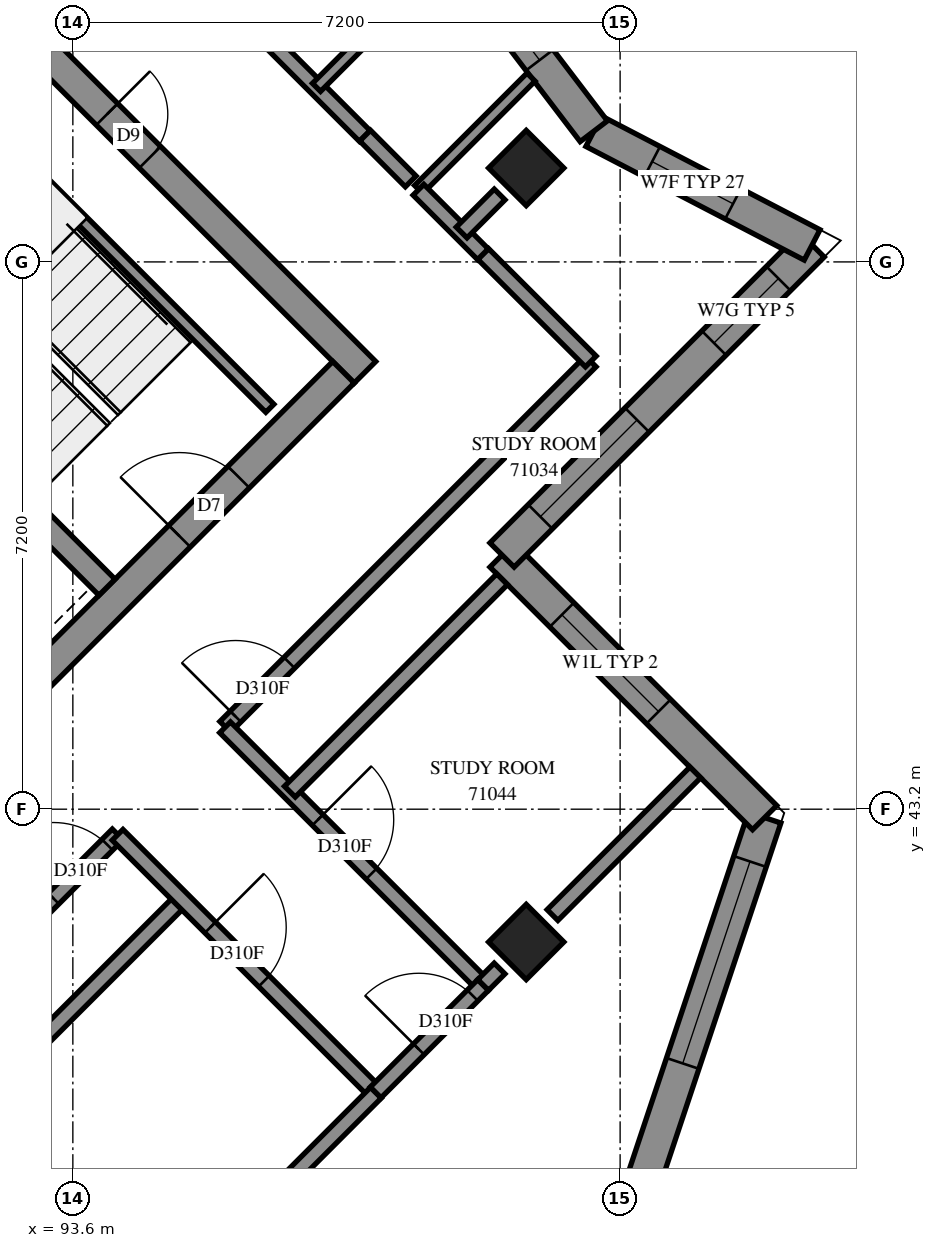
"""IFC4 building model, lengths in metres.
Left out: names, types, materials, properties, quantities, classifications, styles, units other than length and angle.
Written with IfcOpenShell. Run it as: python <this file> out.ifc"""

import sys

from ifc_helpers import new_model, si_unit, direction, frame, frame_2d, origin, origin_2d, place, context, subcontext, project, spatial, polyline, rectangle, outline, extrude, element, fill, save


model = new_model("IFC4")
c1 = context("Model", 3, precision=1e-05, world=origin(), true_north=direction((0.0, 1.0)))
c2 = subcontext(c1, "Body", "Model", "MODEL_VIEW")
j1 = project(units=[si_unit("LENGTHUNIT", "METRE"), si_unit("PLANEANGLEUNIT", "RADIAN")], contexts=[c1])
p1 = place(None, origin())
s1 = spatial("IfcSite", under=j1, at=p1, CompositionType="ELEMENT")
p2 = place(p1, origin())
s2 = spatial("IfcBuilding", under=s1, at=p2, CompositionType="ELEMENT")
p3 = place(p2, frame((0.0, 0.0, 260.8)))
s3 = spatial("IfcBuildingStorey", under=s2, at=p3, CompositionType="ELEMENT", Elevation=260.8)
for number, where, z_axis, x_axis in (
    (1, (99.565, 51.635, 0.0), (0.0, 0.0, 1.0), (0.707, -0.707, 0.0)),
    (2, (99.565, 41.453, 0.0), (0.0, 0.0, 1.0), (0.707, -0.707, 0.0)),
):
    element("IfcColumn", number, at=place(p3, frame(where, z_axis=z_axis, x_axis=x_axis)), inside=s3, PredefinedType="COLUMN", context=c2, shape_type="SweptSolid", body=[
        extrude(rectangle(XDim=0.7, YDim=0.7, at=origin_2d()), origin(), (0.0, 0.0, 1.0), 3.1),
    ])
p4 = place(p3, frame((86.695, 59.696, -0.3), z_axis=(0.0, 0.0, 1.0), x_axis=(0.7071100706, -0.7071034917, 0.0)))
e3 = element("IfcWall", 3, at=p4, inside=s3, PredefinedType="SHEAR", context=c2, shape_type="SweptSolid", body=[
    extrude(rectangle(XDim=15.2, YDim=0.4, at=frame_2d((7.6, 0.0))), origin(), (0.0, 0.0, 1.0), 2.7),
])
p5 = place(p4, frame((10.4, 0.0, 0.3)))
e4 = element("IfcOpeningElement", 4, at=p5, cuts=e3, PredefinedType="OPENING", context=c2, shape_type="SweptSolid", body=[
    extrude(rectangle(XDim=0.8, YDim=2.1, at=frame_2d((0.4, 1.05))), frame((0.0, 0.21, 0.0), z_axis=(0.0, -1.0, 0.0), x_axis=(1.0, 0.0, 0.0)), (0.0, 0.0, 1.0), 0.42),
])
p6 = place(p3, frame((86.978, 38.766, -0.3), z_axis=(0.0, 0.0, 1.0), x_axis=(0.7071067812, 0.7071067812, 0.0)))
e5 = element("IfcWall", 5, at=p6, inside=s3, PredefinedType="SHEAR", context=c2, shape_type="SweptSolid", body=[
    extrude(rectangle(XDim=14.4, YDim=0.4, at=frame_2d((7.2, 0.0))), origin(), (0.0, 0.0, 1.0), 2.7),
])
p7 = place(p6, frame((4.55, 0.0, 0.3)))
e6 = element("IfcOpeningElement", 6, at=p7, cuts=e5, PredefinedType="OPENING", context=c2, shape_type="SweptSolid", body=[
    extrude(rectangle(XDim=1.1, YDim=2.1, at=frame_2d((0.55, 1.05))), frame((0.0, 0.21, 0.0), z_axis=(0.0, -1.0, 0.0), x_axis=(1.0, 0.0, 0.0)), (0.0, 0.0, 1.0), 0.42),
])
p8 = place(p6, frame((11.35, 0.0, 0.3)))
e7 = element("IfcOpeningElement", 7, at=p8, cuts=e5, PredefinedType="OPENING", context=c2, shape_type="SweptSolid", body=[
    extrude(rectangle(XDim=1.1, YDim=2.1, at=frame_2d((0.55, 1.05))), frame((0.0, 0.21, 0.0), z_axis=(0.0, -1.0, 0.0), x_axis=(1.0, 0.0, 0.0)), (0.0, 0.0, 1.0), 0.42),
])
p9 = place(p3, frame((88.958, 51.211, 0.0), z_axis=(0.0, 0.0, 1.0), x_axis=(0.7070998367, -0.7071137256, 0.0)))
e8 = element("IfcWall", 8, at=p9, inside=s3, PredefinedType="SOLIDWALL", context=c2, shape_type="SweptSolid", body=[
    extrude(rectangle(XDim=7.2, YDim=0.3, at=frame_2d((3.6, 0.0))), origin(), (0.0, 0.0, 1.0), 3.1),
])
p10 = place(p3, frame((101.082, 38.232, 0.0), z_axis=(0.0, 0.0, 1.0), x_axis=(0.316227766, 0.9486832981, 0.0)))
e9 = element("IfcWall", 9, at=p10, inside=s3, PredefinedType="SOLIDWALL", context=c2, shape_type="SweptSolid", body=[
    extrude(outline(polyline([(-0.108, -0.225), (5.259, -0.225), (4.981, 0.225), (0.108, 0.225), (-0.108, -0.225)])), origin(), (0.0, 0.0, 1.0), 3.1),
])
p11 = place(p10, frame((1.711, 0.0, 0.45)))
e10 = element("IfcOpeningElement", 10, at=p11, cuts=e9, PredefinedType="OPENING", context=c2, shape_type="SweptSolid", body=[
    extrude(rectangle(XDim=2.8, YDim=2.55, at=frame_2d((1.4, 1.275))), frame((0.0, 0.235, 0.0), z_axis=(0.0, -1.0, 0.0), x_axis=(1.0, 0.0, 0.0)), (0.0, 0.0, 1.0), 0.47),
])
p12 = place(p3, frame((102.701, 43.089, 0.0), z_axis=(0.0, 0.0, 1.0), x_axis=(-0.7070965479, 0.7071170144, 0.0)))
e11 = element("IfcWall", 11, at=p12, inside=s3, PredefinedType="SOLIDWALL", context=c2, shape_type="SweptSolid", body=[
    extrude(outline(polyline([(-0.139, -0.225), (4.661, -0.225), (5.111, 0.225), (0.139, 0.225), (-0.139, -0.225)])), origin(), (0.0, 0.0, 1.0), 3.1),
])
p13 = place(p12, frame((1.974, 0.0, 0.6)))
e12 = element("IfcOpeningElement", 12, at=p13, cuts=e11, PredefinedType="OPENING", context=c2, shape_type="SweptSolid", body=[
    extrude(rectangle(XDim=1.8, YDim=1.9, at=frame_2d((0.9, 0.95))), frame((0.0, 0.235, 0.0), z_axis=(0.0, -1.0, 0.0), x_axis=(1.0, 0.0, 0.0)), (0.0, 0.0, 1.0), 0.47),
])
p14 = place(p3, frame((99.246, 46.544, 0.0), z_axis=(0.0, 0.0, 1.0), x_axis=(0.7071067812, 0.7071067812, 0.0)))
e13 = element("IfcWall", 13, at=p14, inside=s3, PredefinedType="SOLIDWALL", context=c2, shape_type="SweptSolid", body=[
    extrude(outline(polyline([(0.225, -0.225), (6.076, -0.225), (5.462, 0.225), (-0.225, 0.225), (0.225, -0.225)])), origin(), (0.0, 0.0, 1.0), 3.1),
])
p15 = place(p14, frame((0.713, 0.0, 0.6)))
e14 = element("IfcOpeningElement", 14, at=p15, cuts=e13, PredefinedType="OPENING", context=c2, shape_type="SweptSolid", body=[
    extrude(rectangle(XDim=1.8, YDim=1.9, at=frame_2d((0.9, 0.95))), frame((0.0, 0.235, 0.0), z_axis=(0.0, -1.0, 0.0), x_axis=(1.0, 0.0, 0.0)), (0.0, 0.0, 1.0), 0.47),
])
p16 = place(p14, frame((3.944, 0.0, 0.6)))
e15 = element("IfcOpeningElement", 15, at=p16, cuts=e13, PredefinedType="OPENING", context=c2, shape_type="SweptSolid", body=[
    extrude(rectangle(XDim=1.2, YDim=1.9, at=frame_2d((0.6, 0.95))), frame((0.0, 0.235, 0.0), z_axis=(0.0, -1.0, 0.0), x_axis=(1.0, 0.0, 0.0)), (0.0, 0.0, 1.0), 0.47),
])
p17 = place(p3, frame((103.326, 50.624, 0.0), z_axis=(0.0, 0.0, 1.0), x_axis=(-0.8870210657, 0.4617289562, 0.0)))
e16 = element("IfcWall", 16, at=p17, inside=s3, PredefinedType="SOLIDWALL", context=c2, shape_type="SweptSolid", body=[
    extrude(outline(polyline([(-0.307, -0.225), (3.188, -0.225), (3.289, 0.225), (0.307, 0.225), (-0.307, -0.225)])), origin(), (0.0, 0.0, 1.0), 3.1),
])
p18 = place(p17, frame((1.173, 0.0, 0.45)))
e17 = element("IfcOpeningElement", 17, at=p18, cuts=e16, PredefinedType="OPENING", context=c2, shape_type="SweptSolid", body=[
    extrude(rectangle(XDim=1.2, YDim=2.55, at=frame_2d((0.6, 1.275))), frame((0.0, 0.235, 0.0), z_axis=(0.0, -1.0, 0.0), x_axis=(1.0, 0.0, 0.0)), (0.0, 0.0, 1.0), 0.47),
])
p19 = place(p3, frame((100.453, 52.119, 0.0), z_axis=(0.0, 0.0, 1.0), x_axis=(-0.6058900407, 0.7955484012, 0.0)))
e18 = element("IfcWall", 18, at=p19, inside=s3, PredefinedType="SOLIDWALL", context=c2, shape_type="SweptSolid", body=[
    extrude(outline(polyline([(0.05, -0.225), (3.414, -0.225), (3.353, 0.225), (-0.05, 0.225), (0.05, -0.225)])), origin(), (0.0, 0.0, 1.0), 3.1),
])
p20 = place(p19, frame((1.177, 0.0, 0.45)))
e19 = element("IfcOpeningElement", 19, at=p20, cuts=e18, PredefinedType="OPENING", context=c2, shape_type="SweptSolid", body=[
    extrude(rectangle(XDim=1.2, YDim=2.55, at=frame_2d((0.6, 1.275))), frame((0.0, 0.235, 0.0), z_axis=(0.0, -1.0, 0.0), x_axis=(1.0, 0.0, 0.0)), (0.0, 0.0, 1.0), 0.47),
])
p21 = place(p3, frame((91.313, 53.354, 0.0), z_axis=(0.0, 0.0, 1.0), x_axis=(0.7071140275, -0.7070995348, 0.0)))
e20 = element("IfcWall", 20, at=p21, inside=s3, PredefinedType="PARTITIONING", context=c2, shape_type="SweptSolid", body=[
    extrude(rectangle(XDim=6.9, YDim=0.15, at=frame_2d((3.45, 0.0))), origin(), (0.0, 0.0, 1.0), 3.1),
])
p22 = place(p3, frame((84.954, 31.938, 0.0), z_axis=(0.0, 0.0, 1.0), x_axis=(0.7071769042, 0.7070366512, 0.0)))
e21 = element("IfcWall", 21, at=p22, inside=s3, PredefinedType="PARTITIONING", context=c2, shape_type="SweptSolid", body=[
    extrude(rectangle(XDim=14.26, YDim=0.2, at=frame_2d((7.13, 0.0))), origin(), (0.0, 0.0, 1.0), 3.1),
])
p23 = place(p3, frame((86.836, 35.514, 0.0), z_axis=(0.0, 0.0, 1.0), x_axis=(0.7071067812, 0.7071067812, 0.0)))
e22 = element("IfcWall", 22, at=p23, inside=s3, PredefinedType="PARTITIONING", context=c2, shape_type="SweptSolid", body=[
    extrude(rectangle(XDim=10.4, YDim=0.2, at=frame_2d((5.2, 0.0))), origin(), (0.0, 0.0, 1.0), 3.1),
])
p24 = place(p23, frame((9.207, 0.0, 0.0)))
e23 = element("IfcOpeningElement", 23, at=p24, cuts=e22, PredefinedType="OPENING", context=c2, shape_type="SweptSolid", body=[
    extrude(rectangle(XDim=1.0, YDim=2.1, at=frame_2d((0.5, 1.05))), frame((0.0, 0.11, 0.0), z_axis=(0.0, -1.0, 0.0), x_axis=(1.0, 0.0, 0.0)), (0.0, 0.0, 1.0), 0.22),
])
p25 = place(p3, frame((95.605, 44.283, 0.0), z_axis=(0.0, 0.0, 1.0), x_axis=(0.7071067812, 0.7071067812, 0.0)))
e24 = element("IfcWall", 24, at=p25, inside=s3, PredefinedType="PARTITIONING", context=c2, shape_type="SweptSolid", body=[
    extrude(rectangle(XDim=6.8, YDim=0.2, at=frame_2d((3.4, 0.0))), origin(), (0.0, 0.0, 1.0), 3.1),
])
p26 = place(p25, frame((0.193, 0.0, 0.0)))
e25 = element("IfcOpeningElement", 25, at=p26, cuts=e24, PredefinedType="OPENING", context=c2, shape_type="SweptSolid", body=[
    extrude(rectangle(XDim=1.0, YDim=2.1, at=frame_2d((0.5, 1.05))), frame((0.0, 0.11, 0.0), z_axis=(0.0, -1.0, 0.0), x_axis=(1.0, 0.0, 0.0)), (0.0, 0.0, 1.0), 0.22),
])
p27 = place(p3, frame((93.621, 55.875, 0.0), z_axis=(0.0, 0.0, 1.0), x_axis=(0.7071623255, -0.7070512325, 0.0)))
e26 = element("IfcWall", 26, at=p27, inside=s3, PredefinedType="PARTITIONING", context=c2, shape_type="SweptSolid", body=[
    extrude(rectangle(XDim=5.401, YDim=0.2, at=frame_2d((2.7, 0.0))), origin(), (0.0, 0.0, 1.0), 3.1),
])
p28 = place(p27, frame((0.611, 0.0, 0.0)))
e27 = element("IfcOpeningElement", 27, at=p28, cuts=e26, PredefinedType="OPENING", context=c2, shape_type="SweptSolid", body=[
    extrude(rectangle(XDim=0.9, YDim=2.1, at=frame_2d((0.45, 1.05))), frame((0.0, 0.11, 0.0), z_axis=(0.0, -1.0, 0.0), x_axis=(1.0, 0.0, 0.0)), (0.0, 0.0, 1.0), 0.22),
])
p29 = place(p3, frame((95.603, 44.277, 0.0), z_axis=(0.0, 0.0, 1.0), x_axis=(0.7071067812, -0.7071067812, 0.0)))
e28 = element("IfcWall", 28, at=p29, inside=s3, PredefinedType="PARTITIONING", context=c2, shape_type="SweptSolid", body=[
    extrude(rectangle(XDim=4.797, YDim=0.2, at=frame_2d((2.398, 0.0))), origin(), (0.0, 0.0, 1.0), 3.1),
])
p30 = place(p29, frame((1.723, 0.0, 0.0)))
e29 = element("IfcOpeningElement", 29, at=p30, cuts=e28, PredefinedType="OPENING", context=c2, shape_type="SweptSolid", body=[
    extrude(rectangle(XDim=1.0, YDim=2.1, at=frame_2d((0.5, 1.05))), frame((0.0, 0.11, 0.0), z_axis=(0.0, -1.0, 0.0), x_axis=(1.0, 0.0, 0.0)), (0.0, 0.0, 1.0), 0.22),
])
p31 = place(p3, frame((94.189, 42.863, 0.0), z_axis=(0.0, 0.0, 1.0), x_axis=(0.7071067812, -0.7071067812, 0.0)))
e30 = element("IfcWall", 30, at=p31, inside=s3, PredefinedType="PARTITIONING", context=c2, shape_type="SweptSolid", body=[
    extrude(rectangle(XDim=4.797, YDim=0.2, at=frame_2d((2.398, 0.0))), origin(), (0.0, 0.0, 1.0), 3.1),
])
p32 = place(p31, frame((1.723, 0.0, 0.0)))
e31 = element("IfcOpeningElement", 31, at=p32, cuts=e30, PredefinedType="OPENING", context=c2, shape_type="SweptSolid", body=[
    extrude(rectangle(XDim=1.0, YDim=2.1, at=frame_2d((0.5, 1.05))), frame((0.0, 0.11, 0.0), z_axis=(0.0, -1.0, 0.0), x_axis=(1.0, 0.0, 0.0)), (0.0, 0.0, 1.0), 0.22),
])
p33 = place(p3, frame((94.828, 36.709, 0.0), z_axis=(0.0, 0.0, 1.0), x_axis=(0.7068506295, 0.7073628401, 0.0)))
e32 = element("IfcWall", 32, at=p33, inside=s3, PredefinedType="PARTITIONING", context=c2, shape_type="SweptSolid", body=[
    extrude(rectangle(XDim=3.905, YDim=0.2, at=frame_2d((1.952, 0.0))), origin(), (0.0, 0.0, 1.0), 2.6),
])
p34 = place(p3, frame((96.455, 43.431, 0.0), z_axis=(0.0, 0.0, 1.0), x_axis=(0.7068409254, 0.707372537, 0.0)))
e33 = element("IfcWall", 33, at=p34, inside=s3, PredefinedType="PARTITIONING", context=c2, shape_type="SweptSolid", body=[
    extrude(rectangle(XDim=3.95, YDim=0.2, at=frame_2d((1.975, 0.0))), origin(), (0.0, 0.0, 1.0), 3.1),
])
p35 = place(p3, frame((99.91, 41.807, 0.0), z_axis=(0.0, 0.0, 1.0), x_axis=(0.7075021757, 0.7067111654, 0.0)))
e34 = element("IfcWall", 34, at=p35, inside=s3, PredefinedType="PARTITIONING", context=c2, shape_type="SweptSolid", body=[
    extrude(rectangle(XDim=2.655, YDim=0.2, at=frame_2d((1.327, 0.0))), origin(), (0.0, 0.0, 1.0), 3.1),
])
p36 = place(p3, frame((96.806, 52.696, 0.0), z_axis=(0.0, 0.0, 1.0), x_axis=(0.7071067812, 0.7071067812, 0.0)))
e35 = element("IfcWall", 35, at=p36, inside=s3, PredefinedType="PARTITIONING", context=c2, shape_type="SweptSolid", body=[
    extrude(rectangle(XDim=2.348, YDim=0.15, at=frame_2d((1.174, 0.0))), origin(), (0.0, 0.0, 1.0), 3.1),
])
p37 = place(p36, frame((1.236, 0.0, 0.0)))
e36 = element("IfcOpeningElement", 36, at=p37, cuts=e35, PredefinedType="OPENING", context=c2, shape_type="SweptSolid", body=[
    extrude(rectangle(XDim=0.8, YDim=2.1, at=frame_2d((0.4, 1.05))), frame((0.0, 0.085, 0.0), z_axis=(0.0, -1.0, 0.0), x_axis=(1.0, 0.0, 0.0)), (0.0, 0.0, 1.0), 0.17),
])
p38 = place(p3, frame((98.149, 51.353, 0.0), z_axis=(0.0, 0.0, 1.0), x_axis=(0.7070828702, 0.7071306913, 0.0)))
e37 = element("IfcWall", 37, at=p38, inside=s3, PredefinedType="PARTITIONING", context=c2, shape_type="SweptSolid", body=[
    extrude(rectangle(XDim=2.091, YDim=0.15, at=frame_2d((1.046, 0.0))), origin(), (0.0, 0.0, 1.0), 3.1),
])
p39 = place(p3, frame((98.998, 50.504, 0.0), z_axis=(0.0, 0.0, 1.0), x_axis=(0.7076063266, -0.7066068826, 0.0)))
e38 = element("IfcWall", 38, at=p39, inside=s3, PredefinedType="PARTITIONING", context=c2, shape_type="SweptSolid", body=[
    extrude(rectangle(XDim=2.001, YDim=0.2, at=frame_2d((1.001, 0.0))), origin(), (0.0, 0.0, 1.0), 3.1),
])
p40 = place(p3, frame((97.584, 39.474, 0.0), z_axis=(0.0, 0.0, 1.0), x_axis=(0.7071067812, 0.7071067812, 0.0)))
e39 = element("IfcWall", 39, at=p40, inside=s3, PredefinedType="PARTITIONING", context=c2, shape_type="SweptSolid", body=[
    extrude(rectangle(XDim=2.0, YDim=0.2, at=frame_2d((1.0, 0.0))), origin(), (0.0, 0.0, 1.0), 2.6),
])
p41 = place(p40, frame((0.803, 0.0, 0.0)))
e40 = element("IfcOpeningElement", 40, at=p41, cuts=e39, PredefinedType="OPENING", context=c2, shape_type="SweptSolid", body=[
    extrude(rectangle(XDim=1.0, YDim=2.1, at=frame_2d((0.5, 1.05))), frame((0.0, 0.11, 0.0), z_axis=(0.0, -1.0, 0.0), x_axis=(1.0, 0.0, 0.0)), (0.0, 0.0, 1.0), 0.22),
])
p42 = place(p3, frame((98.147, 51.349, 0.0), z_axis=(0.0, 0.0, 1.0), x_axis=(0.7071067812, -0.7071067812, 0.0)))
e41 = element("IfcWall", 41, at=p42, inside=s3, PredefinedType="PARTITIONING", context=c2, shape_type="SweptSolid", body=[
    extrude(rectangle(XDim=1.199, YDim=0.2, at=frame_2d((0.6, 0.0))), origin(), (0.0, 0.0, 1.0), 3.1),
])
p43 = place(p3, frame((97.445, 52.061, 0.0), z_axis=(0.0, 0.0, 1.0), x_axis=(0.7059292536, -0.7082823511, 0.0)))
e42 = element("IfcWall", 42, at=p43, inside=s3, PredefinedType="PARTITIONING", context=c2, shape_type="SweptSolid", body=[
    extrude(rectangle(XDim=0.85, YDim=0.2, at=frame_2d((0.425, 0.0))), origin(), (0.0, 0.0, 1.0), 3.1),
])
p44 = place(p3, frame((98.715, 50.787, 0.0), z_axis=(0.0, 0.0, 1.0), x_axis=(0.7071067812, 0.7071067812, 0.0)))
e43 = element("IfcWall", 43, at=p44, inside=s3, PredefinedType="PARTITIONING", context=c2, shape_type="SweptSolid", body=[
    extrude(rectangle(XDim=0.707, YDim=0.2, at=frame_2d((0.353, 0.0))), origin(), (0.0, 0.0, 1.0), 3.1),
])
p45 = place(p3, frame((98.998, 40.888, 0.0), z_axis=(0.0, 0.0, 1.0), x_axis=(0.7071067812, 0.7071067812, 0.0)))
e44 = element("IfcWall", 44, at=p45, inside=s3, PredefinedType="PARTITIONING", context=c2, shape_type="SweptSolid", body=[
    extrude(rectangle(XDim=0.305, YDim=0.2, at=frame_2d((0.153, 0.0))), origin(), (0.0, 0.0, 1.0), 2.6),
])
p46 = place(p11, origin())
e45 = element("IfcWindow", 45, at=p46, inside=s3, PartitioningType="SINGLE_PANEL", PredefinedType="WINDOW", context=c2, shape_type="SweptSolid", body=[
    extrude(rectangle(XDim=2.8, YDim=2.55, at=frame_2d((1.4, 1.275))), frame((0.0, 0.205, 0.0), z_axis=(0.0, -1.0, 0.0), x_axis=(1.0, 0.0, 0.0)), (0.0, 0.0, 1.0), 0.06),
])
fill(e10, e45)
p47 = place(p13, origin())
e46 = element("IfcWindow", 46, at=p47, inside=s3, PartitioningType="SINGLE_PANEL", PredefinedType="WINDOW", context=c2, shape_type="SweptSolid", body=[
    extrude(rectangle(XDim=1.8, YDim=1.9, at=frame_2d((0.9, 0.95))), frame((0.0, 0.205, 0.0), z_axis=(0.0, -1.0, 0.0), x_axis=(1.0, 0.0, 0.0)), (0.0, 0.0, 1.0), 0.06),
])
fill(e12, e46)
p48 = place(p15, origin())
e47 = element("IfcWindow", 47, at=p48, inside=s3, PartitioningType="SINGLE_PANEL", PredefinedType="WINDOW", context=c2, shape_type="SweptSolid", body=[
    extrude(rectangle(XDim=1.8, YDim=1.9, at=frame_2d((0.9, 0.95))), frame((0.0, 0.205, 0.0), z_axis=(0.0, -1.0, 0.0), x_axis=(1.0, 0.0, 0.0)), (0.0, 0.0, 1.0), 0.06),
])
fill(e14, e47)
p49 = place(p16, origin())
e48 = element("IfcWindow", 48, at=p49, inside=s3, PartitioningType="SINGLE_PANEL", PredefinedType="WINDOW", context=c2, shape_type="SweptSolid", body=[
    extrude(rectangle(XDim=1.2, YDim=1.9, at=frame_2d((0.6, 0.95))), frame((0.0, 0.205, 0.0), z_axis=(0.0, -1.0, 0.0), x_axis=(1.0, 0.0, 0.0)), (0.0, 0.0, 1.0), 0.06),
])
fill(e15, e48)
p50 = place(p18, origin())
e49 = element("IfcWindow", 49, at=p50, inside=s3, PartitioningType="SINGLE_PANEL", PredefinedType="WINDOW", context=c2, shape_type="SweptSolid", body=[
    extrude(rectangle(XDim=1.2, YDim=2.55, at=frame_2d((0.6, 1.275))), frame((0.0, 0.205, 0.0), z_axis=(0.0, -1.0, 0.0), x_axis=(1.0, 0.0, 0.0)), (0.0, 0.0, 1.0), 0.06),
])
fill(e17, e49)
p51 = place(p20, origin())
e50 = element("IfcWindow", 50, at=p51, inside=s3, PartitioningType="SINGLE_PANEL", PredefinedType="WINDOW", context=c2, shape_type="SweptSolid", body=[
    extrude(rectangle(XDim=1.2, YDim=2.55, at=frame_2d((0.6, 1.275))), frame((0.0, 0.205, 0.0), z_axis=(0.0, -1.0, 0.0), x_axis=(1.0, 0.0, 0.0)), (0.0, 0.0, 1.0), 0.06),
])
fill(e19, e50)
p52 = place(p5, origin())
e51 = element("IfcDoor", 51, at=p52, inside=s3, OperationType="SINGLE_SWING_RIGHT", PredefinedType="DOOR", context=c2, shape_type="SweptSolid", body=[
    extrude(rectangle(XDim=0.8, YDim=2.1, at=frame_2d((0.4, 1.05))), frame((0.0, 0.025, 0.0), z_axis=(0.0, -1.0, 0.0), x_axis=(1.0, 0.0, 0.0)), (0.0, 0.0, 1.0), 0.05),
])
fill(e4, e51)
p53 = place(p8, origin())
e52 = element("IfcDoor", 52, at=p53, inside=s3, OperationType="SINGLE_SWING_RIGHT", PredefinedType="DOOR", context=c2, shape_type="SweptSolid", body=[
    extrude(rectangle(XDim=1.1, YDim=2.1, at=frame_2d((0.55, 1.05))), frame((0.0, 0.025, 0.0), z_axis=(0.0, -1.0, 0.0), x_axis=(1.0, 0.0, 0.0)), (0.0, 0.0, 1.0), 0.05),
])
fill(e7, e52)
p54 = place(p26, origin())
e53 = element("IfcDoor", 53, at=p54, inside=s3, OperationType="SINGLE_SWING_LEFT", PredefinedType="DOOR", context=c2, shape_type="SweptSolid", body=[
    extrude(rectangle(XDim=1.0, YDim=2.1, at=frame_2d((0.5, 1.05))), frame((0.0, 0.025, 0.0), z_axis=(0.0, -1.0, 0.0), x_axis=(1.0, 0.0, 0.0)), (0.0, 0.0, 1.0), 0.05),
])
fill(e25, e53)
p55 = place(p24, origin())
e54 = element("IfcDoor", 54, at=p55, inside=s3, OperationType="SINGLE_SWING_RIGHT", PredefinedType="DOOR", context=c2, shape_type="SweptSolid", body=[
    extrude(rectangle(XDim=1.0, YDim=2.1, at=frame_2d((0.5, 1.05))), frame((0.0, 0.025, 0.0), z_axis=(0.0, -1.0, 0.0), x_axis=(1.0, 0.0, 0.0)), (0.0, 0.0, 1.0), 0.05),
])
fill(e23, e54)
p56 = place(p32, origin())
e55 = element("IfcDoor", 55, at=p56, inside=s3, OperationType="SINGLE_SWING_LEFT", PredefinedType="DOOR", context=c2, shape_type="SweptSolid", body=[
    extrude(rectangle(XDim=1.0, YDim=2.1, at=frame_2d((0.5, 1.05))), frame((0.0, 0.025, 0.0), z_axis=(0.0, -1.0, 0.0), x_axis=(1.0, 0.0, 0.0)), (0.0, 0.0, 1.0), 0.05),
])
fill(e31, e55)
p57 = place(p30, origin())
e56 = element("IfcDoor", 56, at=p57, inside=s3, OperationType="SINGLE_SWING_RIGHT", PredefinedType="DOOR", context=c2, shape_type="SweptSolid", body=[
    extrude(rectangle(XDim=1.0, YDim=2.1, at=frame_2d((0.5, 1.05))), frame((0.0, 0.025, 0.0), z_axis=(0.0, -1.0, 0.0), x_axis=(1.0, 0.0, 0.0)), (0.0, 0.0, 1.0), 0.05),
])
fill(e29, e56)
p58 = place(p41, origin())
e57 = element("IfcDoor", 57, at=p58, inside=s3, OperationType="SINGLE_SWING_RIGHT", PredefinedType="DOOR", context=c2, shape_type="SweptSolid", body=[
    extrude(rectangle(XDim=1.0, YDim=2.1, at=frame_2d((0.5, 1.05))), frame((0.0, 0.025, 0.0), z_axis=(0.0, -1.0, 0.0), x_axis=(1.0, 0.0, 0.0)), (0.0, 0.0, 1.0), 0.05),
])
fill(e40, e57)
save(model, sys.argv[1])
